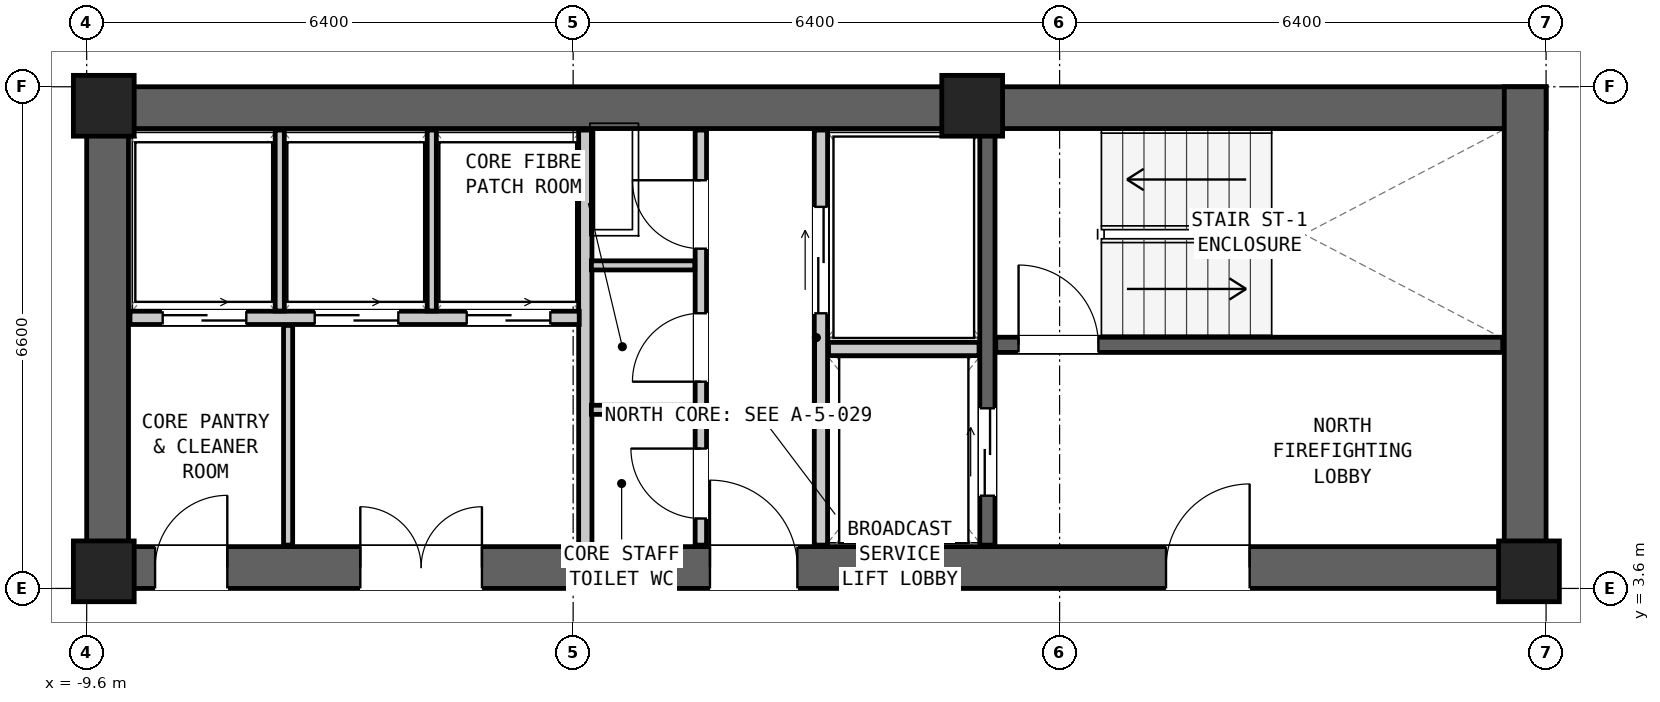
"""IFC4 building model, lengths in metres.
Left out: names, types, materials, properties, quantities, classifications, styles, units other than length and angle.
Written with IfcOpenShell. Run it as: python <this file> out.ifc"""

import sys

from ifc_helpers import new_model, si_unit, direction, frame, frame_2d, origin, origin_2d, place, context, subcontext, project, spatial, rectangle, extrude, element, fill, save


model = new_model("IFC4")
c1 = context("Model", 3, precision=1e-05, world=origin(), true_north=direction((0.0, 1.0)))
c2 = subcontext(c1, "Body", "Model", "MODEL_VIEW")
j1 = project(units=[si_unit("LENGTHUNIT", "METRE"), si_unit("PLANEANGLEUNIT", "RADIAN")], contexts=[c1])
p1 = place(None, origin())
s1 = spatial("IfcSite", under=j1, at=p1, CompositionType="ELEMENT")
p2 = place(p1, origin())
s2 = spatial("IfcBuilding", under=s1, at=p2, CompositionType="ELEMENT")
p3 = place(p2, frame((0.0, 0.0, 90.8)))
s3 = spatial("IfcBuildingStorey", under=s2, at=p3, CompositionType="ELEMENT", Elevation=90.8)
p4 = place(p3, frame((-9.6, 9.925, 0.0), z_axis=(0.0, 0.0, 1.0), x_axis=(1.0, 0.0, 0.0)))
e1 = element("IfcWall", 1, at=p4, inside=s3, PredefinedType="SHEAR", context=c2, shape_type="SweptSolid", body=[
    extrude(rectangle(XDim=19.2, YDim=0.55, at=frame_2d((9.6, 0.0))), origin(), (0.0, 0.0, 1.0), 3.05),
])
p5 = place(p3, frame((-9.6, 3.875, 0.0), z_axis=(0.0, 0.0, 1.0), x_axis=(1.0, 0.0, 0.0)))
e2 = element("IfcWall", 2, at=p5, inside=s3, PredefinedType="SHEAR", context=c2, shape_type="SweptSolid", body=[
    extrude(rectangle(XDim=19.2, YDim=0.55, at=frame_2d((9.6, 0.0))), origin(), (0.0, 0.0, 1.0), 3.05),
])
p6 = place(p5, frame((14.2, 0.0, 0.0)))
e3 = element("IfcOpeningElement", 3, at=p6, cuts=e2, PredefinedType="OPENING", context=c2, shape_type="SweptSolid", body=[
    extrude(rectangle(XDim=1.1, YDim=2.08, at=frame_2d((0.55, 1.04))), frame((0.0, 0.287, 0.0), z_axis=(0.0, -1.0, 0.0), x_axis=(1.0, 0.0, 0.0)), (0.0, 0.0, 1.0), 0.574),
])
p7 = place(p5, frame((8.2, 0.0, 0.0)))
e4 = element("IfcOpeningElement", 4, at=p7, cuts=e2, PredefinedType="OPENING", context=c2, shape_type="SweptSolid", body=[
    extrude(rectangle(XDim=1.15, YDim=2.1, at=frame_2d((0.575, 1.05))), frame((0.0, 0.287, 0.0), z_axis=(0.0, -1.0, 0.0), x_axis=(1.0, 0.0, 0.0)), (0.0, 0.0, 1.0), 0.574),
])
p8 = place(p5, frame((0.9, 0.0, 0.0)))
e5 = element("IfcOpeningElement", 5, at=p8, cuts=e2, PredefinedType="OPENING", context=c2, shape_type="SweptSolid", body=[
    extrude(rectangle(XDim=0.95, YDim=2.1, at=frame_2d((0.475, 1.05))), frame((0.0, 0.287, 0.0), z_axis=(0.0, -1.0, 0.0), x_axis=(1.0, 0.0, 0.0)), (0.0, 0.0, 1.0), 0.574),
])
p9 = place(p5, frame((3.6, 0.0, 0.0)))
e6 = element("IfcOpeningElement", 6, at=p9, cuts=e2, PredefinedType="OPENING", context=c2, shape_type="SweptSolid", body=[
    extrude(rectangle(XDim=1.6, YDim=2.12, at=frame_2d((0.8, 1.06))), frame((0.0, 0.287, 0.0), z_axis=(0.0, -1.0, 0.0), x_axis=(1.0, 0.0, 0.0)), (0.0, 0.0, 1.0), 0.574),
])
for number, where, z_axis, x_axis in (
    (7, (-9.325, 3.6, 0.0), (0.0, 0.0, 1.0), (0.0, 1.0, 0.0)),
    (8, (9.325, 3.6, 0.0), (0.0, 0.0, 1.0), (0.0, 1.0, 0.0)),
):
    element("IfcWall", number, at=place(p3, frame(where, z_axis=z_axis, x_axis=x_axis)), inside=s3, PredefinedType="SHEAR", context=c2, shape_type="SweptSolid", body=[
        extrude(rectangle(XDim=6.6, YDim=0.55, at=frame_2d((3.3, 0.0))), origin(), (0.0, 0.0, 1.0), 3.05),
    ])
for number, where, z_axis, x_axis in (
    (9, (-9.375, 9.95, 0.0), (0.0, 0.0, 1.0), (1.0, 0.0, 0.0)),
    (10, (2.05, 9.95, 0.0), (0.0, 0.0, 1.0), (1.0, 0.0, 0.0)),
    (11, (-9.375, 3.825, 0.0), (0.0, 0.0, 1.0), (1.0, 0.0, 0.0)),
    (12, (9.375, 3.825, 0.0), (0.0, 0.0, 1.0), (1.0, 0.0, 0.0)),
):
    element("IfcColumn", number, at=place(p3, frame(where, z_axis=z_axis, x_axis=x_axis)), inside=s3, PredefinedType="COLUMN", context=c2, shape_type="SweptSolid", body=[
        extrude(rectangle(XDim=0.8, YDim=0.8, at=origin_2d()), origin(), (0.0, 0.0, 1.0), 3.05),
    ])
p10 = place(p3, frame((2.36, 6.805, 0.0), z_axis=(0.0, 0.0, 1.0), x_axis=(1.0, 0.0, 0.0)))
e13 = element("IfcWall", 13, at=p10, inside=s3, PredefinedType="SHEAR", context=c2, shape_type="SweptSolid", body=[
    extrude(rectangle(XDim=6.67, YDim=0.2, at=frame_2d((3.335, 0.0))), origin(), (0.0, 0.0, 1.0), 2.83),
])
p11 = place(p10, frame((0.3, 0.0, 0.0)))
e14 = element("IfcOpeningElement", 14, at=p11, cuts=e13, PredefinedType="OPENING", context=c2, shape_type="SweptSolid", body=[
    extrude(rectangle(XDim=1.05, YDim=2.08, at=frame_2d((0.525, 1.04))), frame((0.0, 0.112, 0.0), z_axis=(0.0, -1.0, 0.0), x_axis=(1.0, 0.0, 0.0)), (0.0, 0.0, 1.0), 0.224),
])
p12 = place(p3, frame((2.25, 4.17, 0.0), z_axis=(0.0, 0.0, 1.0), x_axis=(0.0, 1.0, 0.0)))
e15 = element("IfcWall", 15, at=p12, inside=s3, PredefinedType="SHEAR", context=c2, shape_type="SweptSolid", body=[
    extrude(rectangle(XDim=5.46, YDim=0.2, at=frame_2d((2.73, 0.0))), origin(), (0.0, 0.0, 1.0), 2.83),
])
p13 = place(p12, frame((0.65, 0.0, 0.0)))
e16 = element("IfcOpeningElement", 16, at=p13, cuts=e15, PredefinedType="OPENING", context=c2, shape_type="SweptSolid", body=[
    extrude(rectangle(XDim=1.15, YDim=2.08, at=frame_2d((0.575, 1.04))), frame((0.0, 0.112, 0.0), z_axis=(0.0, -1.0, 0.0), x_axis=(1.0, 0.0, 0.0)), (0.0, 0.0, 1.0), 0.224),
])
p14 = place(p3, frame((0.06, 4.17, 0.0), z_axis=(0.0, 0.0, 1.0), x_axis=(0.0, 1.0, 0.0)))
e17 = element("IfcWall", 17, at=p14, inside=s3, PredefinedType="PARTITIONING", context=c2, shape_type="SweptSolid", body=[
    extrude(rectangle(XDim=5.46, YDim=0.175, at=frame_2d((2.73, 0.0))), origin(), (0.0, 0.0, 1.0), 2.83),
])
p15 = place(p14, frame((3.05, 0.0, 0.0)))
e18 = element("IfcOpeningElement", 18, at=p15, cuts=e17, PredefinedType="OPENING", context=c2, shape_type="SweptSolid", body=[
    extrude(rectangle(XDim=1.4, YDim=2.12, at=frame_2d((0.7, 1.06))), frame((0.0, 0.1, 0.0), z_axis=(0.0, -1.0, 0.0), x_axis=(1.0, 0.0, 0.0)), (0.0, 0.0, 1.0), 0.199),
])
p16 = place(p3, frame((0.16, 6.75, 0.0), z_axis=(0.0, 0.0, 1.0), x_axis=(1.0, 0.0, 0.0)))
e19 = element("IfcWall", 19, at=p16, inside=s3, PredefinedType="PARTITIONING", context=c2, shape_type="SweptSolid", body=[
    extrude(rectangle(XDim=1.98, YDim=0.175, at=frame_2d((0.99, 0.0))), origin(), (0.0, 0.0, 1.0), 2.83),
])
p17 = place(p3, frame((-3.04, 4.17, 0.0), z_axis=(0.0, 0.0, 1.0), x_axis=(0.0, 1.0, 0.0)))
e20 = element("IfcWall", 20, at=p17, inside=s3, PredefinedType="PARTITIONING", context=c2, shape_type="SweptSolid", body=[
    extrude(rectangle(XDim=5.46, YDim=0.175, at=frame_2d((2.73, 0.0))), origin(), (0.0, 0.0, 1.0), 2.83),
])
p18 = place(p3, frame((-1.52, 4.17, 0.0), z_axis=(0.0, 0.0, 1.0), x_axis=(0.0, 1.0, 0.0)))
e21 = element("IfcWall", 21, at=p18, inside=s3, PredefinedType="PARTITIONING", context=c2, shape_type="SweptSolid", body=[
    extrude(rectangle(XDim=5.46, YDim=0.15, at=frame_2d((2.73, 0.0))), origin(), (0.0, 0.0, 1.0), 2.83),
])
p19 = place(p18, frame((3.9, 0.0, 0.0)))
e22 = element("IfcOpeningElement", 22, at=p19, cuts=e21, PredefinedType="OPENING", context=c2, shape_type="SweptSolid", body=[
    extrude(rectangle(XDim=0.9, YDim=2.05, at=frame_2d((0.45, 1.025))), frame((0.0, 0.087, 0.0), z_axis=(0.0, -1.0, 0.0), x_axis=(1.0, 0.0, 0.0)), (0.0, 0.0, 1.0), 0.174),
])
p20 = place(p18, frame((2.15, 0.0, 0.0)))
e23 = element("IfcOpeningElement", 23, at=p20, cuts=e21, PredefinedType="OPENING", context=c2, shape_type="SweptSolid", body=[
    extrude(rectangle(XDim=0.9, YDim=2.05, at=frame_2d((0.45, 1.025))), frame((0.0, 0.087, 0.0), z_axis=(0.0, -1.0, 0.0), x_axis=(1.0, 0.0, 0.0)), (0.0, 0.0, 1.0), 0.174),
])
p21 = place(p18, frame((0.35, 0.0, 0.0)))
e24 = element("IfcOpeningElement", 24, at=p21, cuts=e21, PredefinedType="OPENING", context=c2, shape_type="SweptSolid", body=[
    extrude(rectangle(XDim=0.92, YDim=2.1, at=frame_2d((0.46, 1.05))), frame((0.0, 0.087, 0.0), z_axis=(0.0, -1.0, 0.0), x_axis=(1.0, 0.0, 0.0)), (0.0, 0.0, 1.0), 0.174),
])
for number, where, z_axis, x_axis in (
    (25, (-2.96, 5.95, 0.0), (0.0, 0.0, 1.0), (1.0, 0.0, 0.0)),
    (26, (-2.96, 7.85, 0.0), (0.0, 0.0, 1.0), (1.0, 0.0, 0.0)),
):
    element("IfcWall", number, at=place(p3, frame(where, z_axis=z_axis, x_axis=x_axis)), inside=s3, PredefinedType="PARTITIONING", context=c2, shape_type="SweptSolid", body=[
        extrude(rectangle(XDim=1.36, YDim=0.12, at=frame_2d((0.68, 0.0))), origin(), (0.0, 0.0, 1.0), 2.83),
    ])
p22 = place(p3, frame((-9.03, 7.16, 0.0), z_axis=(0.0, 0.0, 1.0), x_axis=(1.0, 0.0, 0.0)))
e27 = element("IfcWall", 27, at=p22, inside=s3, PredefinedType="PARTITIONING", context=c2, shape_type="SweptSolid", body=[
    extrude(rectangle(XDim=5.91, YDim=0.175, at=frame_2d((2.955, 0.0))), origin(), (0.0, 0.0, 1.0), 2.83),
])
p23 = place(p22, frame((0.43, 0.0, 0.0)))
e28 = element("IfcOpeningElement", 28, at=p23, cuts=e27, PredefinedType="OPENING", context=c2, shape_type="SweptSolid", body=[
    extrude(rectangle(XDim=1.1, YDim=2.06, at=frame_2d((0.55, 1.03))), frame((0.0, 0.1, 0.0), z_axis=(0.0, -1.0, 0.0), x_axis=(1.0, 0.0, 0.0)), (0.0, 0.0, 1.0), 0.199),
])
p24 = place(p22, frame((2.43, 0.0, 0.0)))
e29 = element("IfcOpeningElement", 29, at=p24, cuts=e27, PredefinedType="OPENING", context=c2, shape_type="SweptSolid", body=[
    extrude(rectangle(XDim=1.1, YDim=2.06, at=frame_2d((0.55, 1.03))), frame((0.0, 0.1, 0.0), z_axis=(0.0, -1.0, 0.0), x_axis=(1.0, 0.0, 0.0)), (0.0, 0.0, 1.0), 0.199),
])
p25 = place(p22, frame((4.43, 0.0, 0.0)))
e30 = element("IfcOpeningElement", 30, at=p25, cuts=e27, PredefinedType="OPENING", context=c2, shape_type="SweptSolid", body=[
    extrude(rectangle(XDim=1.1, YDim=2.06, at=frame_2d((0.55, 1.03))), frame((0.0, 0.1, 0.0), z_axis=(0.0, -1.0, 0.0), x_axis=(1.0, 0.0, 0.0)), (0.0, 0.0, 1.0), 0.199),
])
for number, where, z_axis, x_axis in (
    (31, (-7.06, 7.25, 0.0), (0.0, 0.0, 1.0), (0.0, 1.0, 0.0)),
    (32, (-5.06, 7.25, 0.0), (0.0, 0.0, 1.0), (0.0, 1.0, 0.0)),
):
    element("IfcWall", number, at=place(p3, frame(where, z_axis=z_axis, x_axis=x_axis)), inside=s3, PredefinedType="PARTITIONING", context=c2, shape_type="SweptSolid", body=[
        extrude(rectangle(XDim=2.38, YDim=0.12, at=frame_2d((1.19, 0.0))), origin(), (0.0, 0.0, 1.0), 2.83),
    ])
p26 = place(p3, frame((-6.95, 4.17, 0.0), z_axis=(0.0, 0.0, 1.0), x_axis=(0.0, 1.0, 0.0)))
e33 = element("IfcWall", 33, at=p26, inside=s3, PredefinedType="PARTITIONING", context=c2, shape_type="SweptSolid", body=[
    extrude(rectangle(XDim=2.89, YDim=0.12, at=frame_2d((1.445, 0.0))), origin(), (0.0, 0.0, 1.0), 2.83),
])
p27 = place(p11, origin())
e34 = element("IfcDoor", 34, at=p27, inside=s3, OperationType="SINGLE_SWING_LEFT", PredefinedType="DOOR", context=c2, shape_type="SweptSolid", body=[
    extrude(rectangle(XDim=1.05, YDim=2.08, at=frame_2d((0.525, 1.04))), frame((0.0, 0.025, 0.0), z_axis=(0.0, -1.0, 0.0), x_axis=(1.0, 0.0, 0.0)), (0.0, 0.0, 1.0), 0.05),
])
fill(e14, e34)
p28 = place(p6, origin())
e35 = element("IfcDoor", 35, at=p28, inside=s3, OperationType="SINGLE_SWING_RIGHT", PredefinedType="DOOR", context=c2, shape_type="SweptSolid", body=[
    extrude(rectangle(XDim=1.1, YDim=2.08, at=frame_2d((0.55, 1.04))), frame((0.0, 0.025, 0.0), z_axis=(0.0, -1.0, 0.0), x_axis=(1.0, 0.0, 0.0)), (0.0, 0.0, 1.0), 0.05),
])
fill(e3, e35)
p29 = place(p13, origin())
e36 = element("IfcDoor", 36, at=p29, inside=s3, OperationType="DOUBLE_DOOR_SLIDING", PredefinedType="DOOR", context=c2, shape_type="SweptSolid", body=[
    extrude(rectangle(XDim=1.15, YDim=2.08, at=frame_2d((0.575, 1.04))), frame((0.0, 0.025, 0.0), z_axis=(0.0, -1.0, 0.0), x_axis=(1.0, 0.0, 0.0)), (0.0, 0.0, 1.0), 0.05),
])
fill(e16, e36)
p30 = place(p15, origin())
e37 = element("IfcDoor", 37, at=p30, inside=s3, OperationType="DOUBLE_DOOR_SLIDING", PredefinedType="DOOR", context=c2, shape_type="SweptSolid", body=[
    extrude(rectangle(XDim=1.4, YDim=2.12, at=frame_2d((0.7, 1.06))), frame((0.0, 0.025, 0.0), z_axis=(0.0, -1.0, 0.0), x_axis=(1.0, 0.0, 0.0)), (0.0, 0.0, 1.0), 0.05),
])
fill(e18, e37)
p31 = place(p7, origin())
e38 = element("IfcDoor", 38, at=p31, inside=s3, OperationType="SINGLE_SWING_LEFT", PredefinedType="DOOR", context=c2, shape_type="SweptSolid", body=[
    extrude(rectangle(XDim=1.15, YDim=2.1, at=frame_2d((0.575, 1.05))), frame((0.0, 0.025, 0.0), z_axis=(0.0, -1.0, 0.0), x_axis=(1.0, 0.0, 0.0)), (0.0, 0.0, 1.0), 0.05),
])
fill(e4, e38)
p32 = place(p19, origin())
e39 = element("IfcDoor", 39, at=p32, inside=s3, OperationType="SINGLE_SWING_RIGHT", PredefinedType="DOOR", context=c2, shape_type="SweptSolid", body=[
    extrude(rectangle(XDim=0.9, YDim=2.05, at=frame_2d((0.45, 1.025))), frame((0.0, 0.025, 0.0), z_axis=(0.0, -1.0, 0.0), x_axis=(1.0, 0.0, 0.0)), (0.0, 0.0, 1.0), 0.05),
])
fill(e22, e39)
p33 = place(p20, origin())
e40 = element("IfcDoor", 40, at=p33, inside=s3, OperationType="SINGLE_SWING_LEFT", PredefinedType="DOOR", context=c2, shape_type="SweptSolid", body=[
    extrude(rectangle(XDim=0.9, YDim=2.05, at=frame_2d((0.45, 1.025))), frame((0.0, 0.025, 0.0), z_axis=(0.0, -1.0, 0.0), x_axis=(1.0, 0.0, 0.0)), (0.0, 0.0, 1.0), 0.05),
])
fill(e23, e40)
p34 = place(p21, origin())
e41 = element("IfcDoor", 41, at=p34, inside=s3, OperationType="SINGLE_SWING_RIGHT", PredefinedType="DOOR", context=c2, shape_type="SweptSolid", body=[
    extrude(rectangle(XDim=0.92, YDim=2.1, at=frame_2d((0.46, 1.05))), frame((0.0, 0.025, 0.0), z_axis=(0.0, -1.0, 0.0), x_axis=(1.0, 0.0, 0.0)), (0.0, 0.0, 1.0), 0.05),
])
fill(e24, e41)
p35 = place(p23, origin())
e42 = element("IfcDoor", 42, at=p35, inside=s3, OperationType="DOUBLE_DOOR_SLIDING", PredefinedType="DOOR", context=c2, shape_type="SweptSolid", body=[
    extrude(rectangle(XDim=1.1, YDim=2.06, at=frame_2d((0.55, 1.03))), frame((0.0, 0.025, 0.0), z_axis=(0.0, -1.0, 0.0), x_axis=(1.0, 0.0, 0.0)), (0.0, 0.0, 1.0), 0.05),
])
fill(e28, e42)
p36 = place(p24, origin())
e43 = element("IfcDoor", 43, at=p36, inside=s3, OperationType="DOUBLE_DOOR_SLIDING", PredefinedType="DOOR", context=c2, shape_type="SweptSolid", body=[
    extrude(rectangle(XDim=1.1, YDim=2.06, at=frame_2d((0.55, 1.03))), frame((0.0, 0.025, 0.0), z_axis=(0.0, -1.0, 0.0), x_axis=(1.0, 0.0, 0.0)), (0.0, 0.0, 1.0), 0.05),
])
fill(e29, e43)
p37 = place(p25, origin())
e44 = element("IfcDoor", 44, at=p37, inside=s3, OperationType="DOUBLE_DOOR_SLIDING", PredefinedType="DOOR", context=c2, shape_type="SweptSolid", body=[
    extrude(rectangle(XDim=1.1, YDim=2.06, at=frame_2d((0.55, 1.03))), frame((0.0, 0.025, 0.0), z_axis=(0.0, -1.0, 0.0), x_axis=(1.0, 0.0, 0.0)), (0.0, 0.0, 1.0), 0.05),
])
fill(e30, e44)
p38 = place(p8, origin())
e45 = element("IfcDoor", 45, at=p38, inside=s3, OperationType="SINGLE_SWING_RIGHT", PredefinedType="DOOR", context=c2, shape_type="SweptSolid", body=[
    extrude(rectangle(XDim=0.95, YDim=2.1, at=frame_2d((0.475, 1.05))), frame((0.0, 0.025, 0.0), z_axis=(0.0, -1.0, 0.0), x_axis=(1.0, 0.0, 0.0)), (0.0, 0.0, 1.0), 0.05),
])
fill(e5, e45)
p39 = place(p9, origin())
e46 = element("IfcDoor", 46, at=p39, inside=s3, OperationType="DOUBLE_DOOR_SINGLE_SWING", PredefinedType="DOOR", context=c2, shape_type="SweptSolid", body=[
    extrude(rectangle(XDim=1.6, YDim=2.12, at=frame_2d((0.8, 1.06))), frame((0.0, 0.025, 0.0), z_axis=(0.0, -1.0, 0.0), x_axis=(1.0, 0.0, 0.0)), (0.0, 0.0, 1.0), 0.05),
])
fill(e6, e46)
save(model, sys.argv[1])
